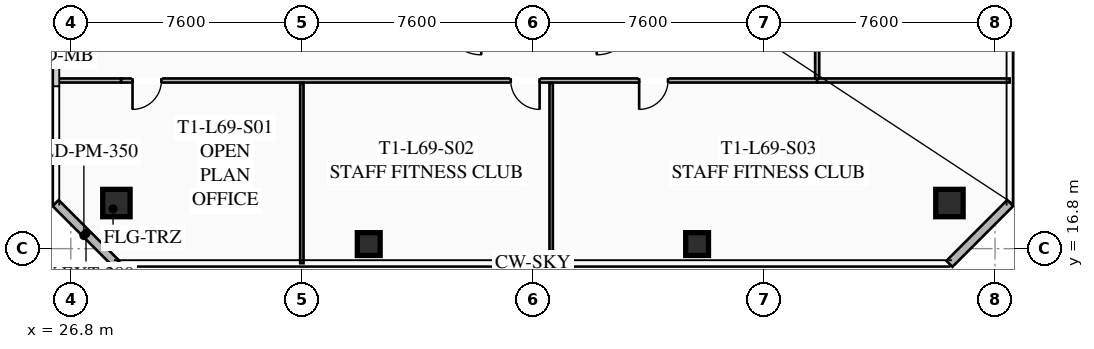
"""IFC4 building model, lengths in metres.
Left out: names, types, materials, properties, quantities, classifications, styles, units other than length and angle.
Written with IfcOpenShell. Run it as: python <this file> out.ifc"""

import sys

from ifc_helpers import new_model, si_unit, direction, frame, frame_2d, origin, origin_2d, place, context, subcontext, project, spatial, rectangle, hollow_rectangle, extrude, element, fill, save


model = new_model("IFC4")
c1 = context("Model", 3, precision=1e-05, world=origin(), true_north=direction((0.0, 1.0)))
c2 = subcontext(c1, "Body", "Model", "MODEL_VIEW")
j1 = project(units=[si_unit("LENGTHUNIT", "METRE"), si_unit("PLANEANGLEUNIT", "RADIAN")], contexts=[c1])
p1 = place(None, origin())
s1 = spatial("IfcSite", under=j1, at=p1, CompositionType="ELEMENT")
p2 = place(p1, origin())
s2 = spatial("IfcBuilding", under=s1, at=p2, CompositionType="ELEMENT")
p3 = place(p2, frame((0.0, 0.0, 255.4)))
s3 = spatial("IfcBuildingStorey", under=s2, at=p3, CompositionType="ELEMENT", Elevation=255.4)
for number, where, z_axis, x_axis in (
    (1, (28.3, 18.3, 0.0), (0.0, 0.0, 1.0), (1.0, 0.0, 0.0)),
    (2, (55.7, 18.3, 0.0), (0.0, 0.0, 1.0), (1.0, 0.0, 0.0)),
):
    element("IfcColumn", number, at=place(p3, frame(where, z_axis=z_axis, x_axis=x_axis)), inside=s3, PredefinedType="COLUMN", context=c2, shape_type="SweptSolid", body=[
        extrude(hollow_rectangle(XDim=0.9, YDim=0.9, WallThickness=0.04, at=origin_2d()), origin(), (0.0, 0.0, 1.0), 3.78),
    ])
for number, where, z_axis, x_axis in (
    (3, (36.6, 16.95, 0.0), (0.0, 0.0, 1.0), (1.0, 0.0, 0.0)),
    (4, (47.4, 16.95, 0.0), (0.0, 0.0, 1.0), (1.0, 0.0, 0.0)),
):
    element("IfcColumn", number, at=place(p3, frame(where, z_axis=z_axis, x_axis=x_axis)), inside=s3, PredefinedType="COLUMN", context=c2, shape_type="SweptSolid", body=[
        extrude(hollow_rectangle(XDim=0.75, YDim=0.75, WallThickness=0.032, at=origin_2d()), origin(), (0.0, 0.0, 1.0), 3.78),
    ])
for number, where, z_axis, x_axis in (
    (5, (28.3, 16.3, 0.0), (0.0, 0.0, 1.0), (-0.707, 0.707, 0.0)),
    (6, (57.7, 18.3, 0.0), (0.0, 0.0, 1.0), (-0.707, -0.707, 0.0)),
):
    element("IfcWall", number, at=place(p3, frame(where, z_axis=z_axis, x_axis=x_axis)), inside=s3, PredefinedType="SOLIDWALL", context=c2, shape_type="SweptSolid", body=[
        extrude(rectangle(XDim=2.828, YDim=0.28, at=frame_2d((1.414, 0.0))), origin(), (0.0, 0.0, 1.0), 3.78),
    ])
p4 = place(p3, frame((51.35, 22.33, 0.0), z_axis=(0.0, 0.0, 1.0), x_axis=(-1.0, 0.0, 0.0)))
e7 = element("IfcWall", 7, at=p4, inside=s3, PredefinedType="PARTITIONING", context=c2, shape_type="SweptSolid", body=[
    extrude(rectangle(XDim=22.9, YDim=0.135, at=frame_2d((11.45, 0.0))), origin(), (0.0, 0.0, 1.0), 2.971),
])
p5 = place(p4, frame((21.57, 0.0, 0.0)))
e8 = element("IfcOpeningElement", 8, at=p5, cuts=e7, PredefinedType="OPENING", context=c2, shape_type="SweptSolid", body=[
    extrude(rectangle(XDim=0.95, YDim=2.05, at=frame_2d((0.475, 1.025))), frame((0.0, 0.077, 0.0), z_axis=(0.0, -1.0, 0.0), x_axis=(1.0, 0.0, 0.0)), (0.0, 0.0, 1.0), 0.155),
])
p6 = place(p4, frame((9.13, 0.0, 0.0)))
e9 = element("IfcOpeningElement", 9, at=p6, cuts=e7, PredefinedType="OPENING", context=c2, shape_type="SweptSolid", body=[
    extrude(rectangle(XDim=0.95, YDim=2.05, at=frame_2d((0.475, 1.025))), frame((0.0, 0.077, 0.0), z_axis=(0.0, -1.0, 0.0), x_axis=(1.0, 0.0, 0.0)), (0.0, 0.0, 1.0), 0.155),
])
p7 = place(p4, frame((4.906, 0.0, 0.0)))
e10 = element("IfcOpeningElement", 10, at=p7, cuts=e7, PredefinedType="OPENING", context=c2, shape_type="SweptSolid", body=[
    extrude(rectangle(XDim=0.95, YDim=2.05, at=frame_2d((0.475, 1.025))), frame((0.0, 0.077, 0.0), z_axis=(0.0, -1.0, 0.0), x_axis=(1.0, 0.0, 0.0)), (0.0, 0.0, 1.0), 0.155),
])
p8 = place(p3, frame((26.32, 22.33, 0.0), z_axis=(0.0, 0.0, 1.0), x_axis=(1.0, 0.0, 0.0)))
e11 = element("IfcWall", 11, at=p8, inside=s3, PredefinedType="PARTITIONING", context=c2, shape_type="SweptSolid", body=[
    extrude(rectangle(XDim=2.13, YDim=0.135, at=frame_2d((1.065, 0.0))), origin(), (0.0, 0.0, 1.0), 2.971),
])
p9 = place(p3, frame((51.35, 22.33, 0.0), z_axis=(0.0, 0.0, 1.0), x_axis=(1.0, 0.0, 0.0)))
e12 = element("IfcWall", 12, at=p9, inside=s3, PredefinedType="PARTITIONING", context=c2, shape_type="SweptSolid", body=[
    extrude(rectangle(XDim=6.33, YDim=0.135, at=frame_2d((3.165, 0.0))), origin(), (0.0, 0.0, 1.0), 2.971),
])
for number, where, z_axis, x_axis in (
    (13, (34.4, 16.32, 0.0), (0.0, 0.0, 1.0), (0.0, 1.0, 0.0)),
    (14, (42.6, 16.32, 0.0), (0.0, 0.0, 1.0), (0.0, 1.0, 0.0)),
):
    element("IfcWall", number, at=place(p3, frame(where, z_axis=z_axis, x_axis=x_axis)), inside=s3, PredefinedType="PARTITIONING", context=c2, shape_type="SweptSolid", body=[
        extrude(rectangle(XDim=5.93, YDim=0.11, at=frame_2d((2.965, 0.0))), origin(), (0.0, 0.0, 1.0), 2.971),
    ])
p10 = place(p3, frame((51.35, 29.72, 0.0), z_axis=(0.0, 0.0, 1.0), x_axis=(0.0, -1.0, 0.0)))
e15 = element("IfcWall", 15, at=p10, inside=s3, PredefinedType="PARTITIONING", context=c2, shape_type="SweptSolid", body=[
    extrude(rectangle(XDim=7.31, YDim=0.135, at=frame_2d((3.655, 0.0))), origin(), (0.0, 0.0, 1.0), 2.971),
])
p11 = place(p10, frame((1.8, 0.0, 0.0)))
e16 = element("IfcOpeningElement", 16, at=p11, cuts=e15, PredefinedType="OPENING", context=c2, shape_type="SweptSolid", body=[
    extrude(rectangle(XDim=0.95, YDim=2.05, at=frame_2d((0.475, 1.025))), frame((0.0, 0.077, 0.0), z_axis=(0.0, -1.0, 0.0), x_axis=(1.0, 0.0, 0.0)), (0.0, 0.0, 1.0), 0.155),
])
p12 = place(p5, origin())
e17 = element("IfcDoor", 17, at=p12, inside=s3, OperationType="SINGLE_SWING_RIGHT", PredefinedType="DOOR", context=c2, shape_type="SweptSolid", body=[
    extrude(rectangle(XDim=0.95, YDim=2.05, at=frame_2d((0.475, 1.025))), frame((0.0, 0.025, 0.0), z_axis=(0.0, -1.0, 0.0), x_axis=(1.0, 0.0, 0.0)), (0.0, 0.0, 1.0), 0.05),
])
fill(e8, e17)
p13 = place(p6, origin())
e18 = element("IfcDoor", 18, at=p13, inside=s3, OperationType="SINGLE_SWING_LEFT", PredefinedType="DOOR", context=c2, shape_type="SweptSolid", body=[
    extrude(rectangle(XDim=0.95, YDim=2.05, at=frame_2d((0.475, 1.025))), frame((0.0, 0.025, 0.0), z_axis=(0.0, -1.0, 0.0), x_axis=(1.0, 0.0, 0.0)), (0.0, 0.0, 1.0), 0.05),
])
fill(e9, e18)
p14 = place(p7, origin())
e19 = element("IfcDoor", 19, at=p14, inside=s3, OperationType="SINGLE_SWING_RIGHT", PredefinedType="DOOR", context=c2, shape_type="SweptSolid", body=[
    extrude(rectangle(XDim=0.95, YDim=2.05, at=frame_2d((0.475, 1.025))), frame((0.0, 0.025, 0.0), z_axis=(0.0, -1.0, 0.0), x_axis=(1.0, 0.0, 0.0)), (0.0, 0.0, 1.0), 0.05),
])
fill(e10, e19)
save(model, sys.argv[1])
